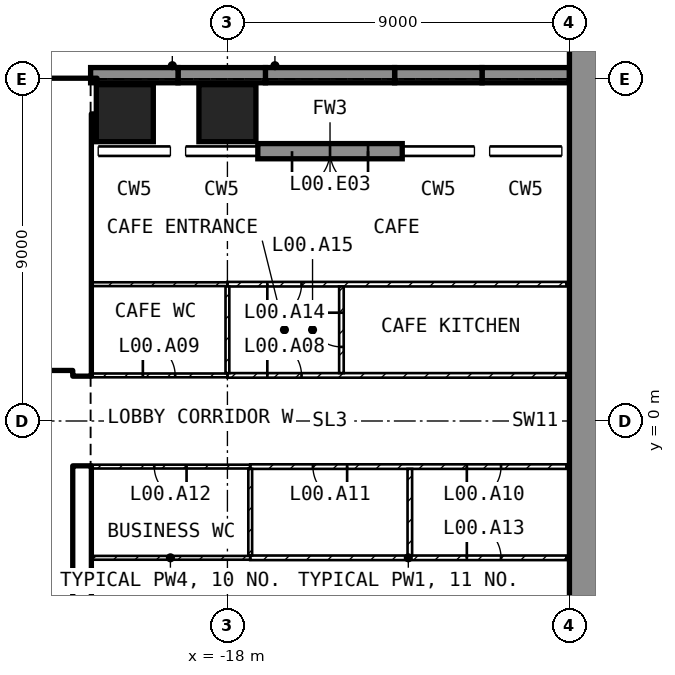
"""IFC4 building model, lengths in metres.
Left out: names, types, materials, properties, quantities, classifications, styles, units other than length and angle.
Written with IfcOpenShell. Run it as: python <this file> out.ifc"""

import sys

from ifc_helpers import new_model, si_unit, direction, frame, frame_2d, origin, origin_2d, place, context, subcontext, project, spatial, polyline, rectangle, outline, extrude, element, fill, save


model = new_model("IFC4")
c1 = context("Model", 3, precision=1e-05, world=origin(), true_north=direction((0.0, 1.0)))
c2 = subcontext(c1, "Body", "Model", "MODEL_VIEW")
j1 = project(units=[si_unit("LENGTHUNIT", "METRE"), si_unit("PLANEANGLEUNIT", "RADIAN")], contexts=[c1])
p1 = place(None, origin())
s1 = spatial("IfcSite", under=j1, at=p1, CompositionType="ELEMENT")
p2 = place(p1, origin())
s2 = spatial("IfcBuilding", under=s1, at=p2, CompositionType="ELEMENT")
p3 = place(p2, origin())
s3 = spatial("IfcBuildingStorey", under=s2, at=p3, CompositionType="ELEMENT", Elevation=0.0)
p4 = place(p3, frame((-7.65, -25.2, -0.4), z_axis=(0.0, 0.0, 1.0), x_axis=(0.0, 1.0, 0.0)))
e1 = element("IfcWall", 1, at=p4, inside=s3, PredefinedType="SOLIDWALL", context=c2, shape_type="SweptSolid", body=[
    extrude(rectangle(XDim=50.4, YDim=2.7, at=frame_2d((25.2, 0.0))), origin(), (0.0, 0.0, 1.0), 20.0),
])
for number, where, z_axis, x_axis in (
    (2, (-20.7, 8.1, -0.4), (0.0, 0.0, 1.0), (1.0, 0.0, 0.0)),
    (3, (-18.0, 8.1, -0.4), (0.0, 0.0, 1.0), (1.0, 0.0, 0.0)),
):
    element("IfcColumn", number, at=place(p3, frame(where, z_axis=z_axis, x_axis=x_axis)), inside=s3, PredefinedType="COLUMN", context=c2, shape_type="SweptSolid", body=[
        extrude(rectangle(XDim=1.5, YDim=1.5, at=origin_2d()), origin(), (0.0, 0.0, 1.0), 15.1),
    ])
for number, where, z_axis, x_axis in (
    (4, (-9.0, 8.9, 0.0), (0.0, 1.0, 0.0), (-1.0, 0.0, 0.0)),
    (5, (-11.3, 8.9, 0.0), (0.0, 1.0, 0.0), (-1.0, 0.0, 0.0)),
):
    element("IfcWall", number, at=place(p3, frame(where, z_axis=z_axis, x_axis=x_axis)), inside=s3, PredefinedType="SOLIDWALL", context=c2, shape_type="SweptSolid", body=[
        extrude(outline(polyline([(0.0, 0.0), (0.3, 0.0), (0.3, 9.0), (0.316, 9.166), (0.365, 9.325), (0.443, 9.472), (0.549, 9.601), (0.678, 9.707), (0.825, 9.785), (0.984, 9.834), (1.15, 9.85), (1.316, 9.834), (1.475, 9.785), (1.622, 9.707), (1.751, 9.601), (1.857, 9.472), (1.935, 9.325), (1.984, 9.166), (2.0, 9.0), (2.0, 0.0), (2.3, 0.0), (2.3, 14.0), (0.0, 14.0), (0.0, 0.0)])), origin(), (0.0, 0.0, 1.0), 0.4),
    ])
p5 = place(p3, frame((-13.6, 8.9, 0.0), z_axis=(0.0, 1.0, 0.0), x_axis=(-1.0, 0.0, 0.0)))
e6 = element("IfcWall", 6, at=p5, inside=s3, PredefinedType="SOLIDWALL", context=c2, shape_type="SweptSolid", body=[
    extrude(outline(polyline([(0.0, 0.0), (0.3, 0.0), (0.3, 9.0), (0.327, 9.273), (0.406, 9.536), (0.536, 9.778), (0.71, 9.99), (0.922, 10.164), (1.164, 10.293), (1.427, 10.373), (1.7, 10.4), (1.973, 10.373), (2.236, 10.293), (2.478, 10.164), (2.69, 9.99), (2.864, 9.778), (2.993, 9.536), (3.073, 9.273), (3.1, 9.0), (3.1, 0.0), (3.4, 0.0), (3.4, 14.0), (0.0, 14.0), (0.0, 0.0)])), origin(), (0.0, 0.0, 1.0), 0.4),
])
p6 = place(p3, frame((-13.4, 7.1, 0.0), z_axis=(0.0, 0.0, 1.0), x_axis=(-1.0, 0.0, 0.0)))
e7 = element("IfcWall", 7, at=p6, inside=s3, PredefinedType="SOLIDWALL", context=c2, shape_type="SweptSolid", body=[
    extrude(rectangle(XDim=3.8, YDim=0.4, at=frame_2d((1.9, 0.0))), origin(), (0.0, 0.0, 1.0), 14.7),
])
p7 = place(p6, frame((0.9, 0.0, 0.0)))
e8 = element("IfcOpeningElement", 8, at=p7, cuts=e7, PredefinedType="OPENING", context=c2, shape_type="SweptSolid", body=[
    extrude(rectangle(XDim=2.0, YDim=2.4, at=frame_2d((1.0, 1.2))), frame((0.0, 0.21, 0.0), z_axis=(0.0, -1.0, 0.0), x_axis=(1.0, 0.0, 0.0)), (0.0, 0.0, 1.0), 0.42),
])
for number, where, z_axis, x_axis in (
    (9, (-17.0, 8.9, 0.0), (0.0, 1.0, 0.0), (-1.0, 0.0, 0.0)),
    (10, (-19.3, 8.9, 0.0), (0.0, 1.0, 0.0), (-1.0, 0.0, 0.0)),
):
    element("IfcWall", number, at=place(p3, frame(where, z_axis=z_axis, x_axis=x_axis)), inside=s3, PredefinedType="SOLIDWALL", context=c2, shape_type="SweptSolid", body=[
        extrude(outline(polyline([(0.0, 0.0), (0.3, 0.0), (0.3, 9.0), (0.316, 9.166), (0.365, 9.325), (0.443, 9.472), (0.549, 9.601), (0.678, 9.707), (0.825, 9.785), (0.984, 9.834), (1.15, 9.85), (1.316, 9.834), (1.475, 9.785), (1.622, 9.707), (1.751, 9.601), (1.857, 9.472), (1.935, 9.325), (1.984, 9.166), (2.0, 9.0), (2.0, 0.0), (2.3, 0.0), (2.3, 14.0), (0.0, 14.0), (0.0, 0.0)])), origin(), (0.0, 0.0, 1.0), 0.4),
    ])
p8 = place(p3, frame((-31.5, 8.55, 0.0), z_axis=(0.0, 0.0, 1.0), x_axis=(1.0, 0.0, 0.0)))
e11 = element("IfcWall", 11, at=p8, inside=s3, PredefinedType="SHEAR", context=c2, shape_type="SweptSolid", body=[
    extrude(rectangle(XDim=10.05, YDim=0.9, at=frame_2d((5.025, 0.0))), origin(), (0.0, 0.0, 1.0), 14.7),
])
p9 = place(p8, frame((8.25, 0.0, 0.0)))
e12 = element("IfcOpeningElement", 12, at=p9, cuts=e11, PredefinedType="OPENING", context=c2, shape_type="SweptSolid", body=[
    extrude(rectangle(XDim=1.0, YDim=2.1, at=frame_2d((0.5, 1.05))), frame((0.0, 0.46, 0.0), z_axis=(0.0, -1.0, 0.0), x_axis=(1.0, 0.0, 0.0)), (0.0, 0.0, 1.0), 0.92),
])
for number, where, z_axis, x_axis in (
    (13, (-21.825, -8.1, 0.0), (0.0, 0.0, 1.0), (0.0, 1.0, 0.0)),
    (14, (-21.825, 1.2, 0.0), (0.0, 0.0, 1.0), (0.0, 1.0, 0.0)),
):
    element("IfcWall", number, at=place(p3, frame(where, z_axis=z_axis, x_axis=x_axis)), inside=s3, PredefinedType="SHEAR", context=c2, shape_type="SweptSolid", body=[
        extrude(rectangle(XDim=6.9, YDim=0.45, at=frame_2d((3.45, 0.0))), origin(), (0.0, 0.0, 1.0), 14.7),
    ])
p10 = place(p3, frame((-35.1, 1.45, 0.0), z_axis=(0.0, 0.0, 1.0), x_axis=(1.0, 0.0, 0.0)))
e15 = element("IfcWall", 15, at=p10, inside=s3, PredefinedType="SOLIDWALL", context=c2, shape_type="SweptSolid", body=[
    extrude(rectangle(XDim=13.05, YDim=0.2, at=frame_2d((6.525, 0.0))), origin(), (0.0, 0.0, 1.0), 14.7),
])
p11 = place(p10, frame((3.45, 0.0, 0.0)))
e16 = element("IfcOpeningElement", 16, at=p11, cuts=e15, PredefinedType="OPENING", context=c2, shape_type="SweptSolid", body=[
    extrude(rectangle(XDim=1.0, YDim=2.1, at=frame_2d((0.5, 1.05))), frame((0.0, 0.11, 0.0), z_axis=(0.0, -1.0, 0.0), x_axis=(1.0, 0.0, 0.0)), (0.0, 0.0, 1.0), 0.22),
])
p12 = place(p10, frame((0.95, 0.0, 0.0)))
e17 = element("IfcOpeningElement", 17, at=p12, cuts=e15, PredefinedType="OPENING", context=c2, shape_type="SweptSolid", body=[
    extrude(rectangle(XDim=1.0, YDim=2.1, at=frame_2d((0.5, 1.05))), frame((0.0, 0.11, 0.0), z_axis=(0.0, -1.0, 0.0), x_axis=(1.0, 0.0, 0.0)), (0.0, 0.0, 1.0), 0.22),
])
p13 = place(p10, frame((11.3, 0.0, 0.0)))
e18 = element("IfcOpeningElement", 18, at=p13, cuts=e15, PredefinedType="OPENING", context=c2, shape_type="SweptSolid", body=[
    extrude(rectangle(XDim=1.0, YDim=2.1, at=frame_2d((0.5, 1.05))), frame((0.0, 0.11, 0.0), z_axis=(0.0, -1.0, 0.0), x_axis=(1.0, 0.0, 0.0)), (0.0, 0.0, 1.0), 0.22),
])
p14 = place(p10, frame((8.8, 0.0, 0.0)))
e19 = element("IfcOpeningElement", 19, at=p14, cuts=e15, PredefinedType="OPENING", context=c2, shape_type="SweptSolid", body=[
    extrude(rectangle(XDim=1.0, YDim=2.1, at=frame_2d((0.5, 1.05))), frame((0.0, 0.11, 0.0), z_axis=(0.0, -1.0, 0.0), x_axis=(1.0, 0.0, 0.0)), (0.0, 0.0, 1.0), 0.22),
])
p15 = place(p3, frame((-28.35, 5.15, 0.0), z_axis=(0.0, 0.0, 1.0), x_axis=(1.0, 0.0, 0.0)))
e20 = element("IfcWall", 20, at=p15, inside=s3, PredefinedType="SOLIDWALL", context=c2, shape_type="SweptSolid", body=[
    extrude(rectangle(XDim=6.3, YDim=0.2, at=frame_2d((3.15, 0.0))), origin(), (0.0, 0.0, 1.0), 14.7),
])
p16 = place(p15, frame((5.1, 0.0, 0.0)))
e21 = element("IfcOpeningElement", 21, at=p16, cuts=e20, PredefinedType="OPENING", context=c2, shape_type="SweptSolid", body=[
    extrude(rectangle(XDim=1.0, YDim=2.1, at=frame_2d((0.5, 1.05))), frame((0.0, 0.11, 0.0), z_axis=(0.0, -1.0, 0.0), x_axis=(1.0, 0.0, 0.0)), (0.0, 0.0, 1.0), 0.22),
])
p17 = place(p3, frame((-18.0, 1.2, 0.0), z_axis=(0.0, 0.0, 1.0), x_axis=(1.0, 0.0, 0.0)))
e22 = element("IfcWall", 22, at=p17, inside=s3, PredefinedType="PARTITIONING", context=c2, shape_type="SweptSolid", body=[
    extrude(rectangle(XDim=8.92, YDim=0.12, at=frame_2d((4.46, 0.0))), origin(), (0.0, 0.0, 1.0), 14.7),
])
p18 = place(p17, frame((1.05, 0.0, 0.0)))
e23 = element("IfcOpeningElement", 23, at=p18, cuts=e22, PredefinedType="OPENING", context=c2, shape_type="SweptSolid", body=[
    extrude(rectangle(XDim=0.9, YDim=2.1, at=frame_2d((0.45, 1.05))), frame((0.0, 0.07, 0.0), z_axis=(0.0, -1.0, 0.0), x_axis=(1.0, 0.0, 0.0)), (0.0, 0.0, 1.0), 0.14),
])
p19 = place(p3, frame((-21.6, 1.2, 0.0), z_axis=(0.0, 0.0, 1.0), x_axis=(1.0, 0.0, 0.0)))
e24 = element("IfcWall", 24, at=p19, inside=s3, PredefinedType="PARTITIONING", context=c2, shape_type="SweptSolid", body=[
    extrude(rectangle(XDim=3.6, YDim=0.1, at=frame_2d((1.8, 0.0))), origin(), (0.0, 0.0, 1.0), 14.7),
])
p20 = place(p19, frame((1.375, 0.0, 0.0)))
e25 = element("IfcOpeningElement", 25, at=p20, cuts=e24, PredefinedType="OPENING", context=c2, shape_type="SweptSolid", body=[
    extrude(rectangle(XDim=0.85, YDim=2.1, at=frame_2d((0.425, 1.05))), frame((0.0, 0.06, 0.0), z_axis=(0.0, -1.0, 0.0), x_axis=(1.0, 0.0, 0.0)), (0.0, 0.0, 1.0), 0.12),
])
p21 = place(p3, frame((-9.08, -1.2, 0.0), z_axis=(0.0, 0.0, 1.0), x_axis=(-1.0, 0.0, 0.0)))
e26 = element("IfcWall", 26, at=p21, inside=s3, PredefinedType="PARTITIONING", context=c2, shape_type="SweptSolid", body=[
    extrude(rectangle(XDim=8.32, YDim=0.12, at=frame_2d((4.16, 0.0))), origin(), (0.0, 0.0, 1.0), 14.7),
])
p22 = place(p21, frame((1.72, 0.0, 0.0)))
e27 = element("IfcOpeningElement", 27, at=p22, cuts=e26, PredefinedType="OPENING", context=c2, shape_type="SweptSolid", body=[
    extrude(rectangle(XDim=0.9, YDim=2.1, at=frame_2d((0.45, 1.05))), frame((0.0, 0.07, 0.0), z_axis=(0.0, -1.0, 0.0), x_axis=(1.0, 0.0, 0.0)), (0.0, 0.0, 1.0), 0.14),
])
p23 = place(p21, frame((5.77, 0.0, 0.0)))
e28 = element("IfcOpeningElement", 28, at=p23, cuts=e26, PredefinedType="OPENING", context=c2, shape_type="SweptSolid", body=[
    extrude(rectangle(XDim=0.9, YDim=2.1, at=frame_2d((0.45, 1.05))), frame((0.0, 0.07, 0.0), z_axis=(0.0, -1.0, 0.0), x_axis=(1.0, 0.0, 0.0)), (0.0, 0.0, 1.0), 0.14),
])
p24 = place(p3, frame((-17.4, -1.2, 0.0), z_axis=(0.0, 0.0, 1.0), x_axis=(-1.0, 0.0, 0.0)))
e29 = element("IfcWall", 29, at=p24, inside=s3, PredefinedType="PARTITIONING", context=c2, shape_type="SweptSolid", body=[
    extrude(rectangle(XDim=4.2, YDim=0.1, at=frame_2d((2.1, 0.0))), origin(), (0.0, 0.0, 1.0), 14.7),
])
p25 = place(p24, frame((1.675, 0.0, 0.0)))
e30 = element("IfcOpeningElement", 30, at=p25, cuts=e29, PredefinedType="OPENING", context=c2, shape_type="SweptSolid", body=[
    extrude(rectangle(XDim=0.85, YDim=2.1, at=frame_2d((0.425, 1.05))), frame((0.0, 0.06, 0.0), z_axis=(0.0, -1.0, 0.0), x_axis=(1.0, 0.0, 0.0)), (0.0, 0.0, 1.0), 0.12),
])
p26 = place(p3, frame((-9.08, 3.6, 0.0), z_axis=(0.0, 0.0, 1.0), x_axis=(-1.0, 0.0, 0.0)))
e31 = element("IfcWall", 31, at=p26, inside=s3, PredefinedType="PARTITIONING", context=c2, shape_type="SweptSolid", body=[
    extrude(rectangle(XDim=8.92, YDim=0.12, at=frame_2d((4.46, 0.0))), origin(), (0.0, 0.0, 1.0), 14.7),
])
p27 = place(p26, frame((6.97, 0.0, 0.0)))
e32 = element("IfcOpeningElement", 32, at=p27, cuts=e31, PredefinedType="OPENING", context=c2, shape_type="SweptSolid", body=[
    extrude(rectangle(XDim=0.9, YDim=2.1, at=frame_2d((0.45, 1.05))), frame((0.0, 0.07, 0.0), z_axis=(0.0, -1.0, 0.0), x_axis=(1.0, 0.0, 0.0)), (0.0, 0.0, 1.0), 0.14),
])
p28 = place(p3, frame((-18.0, 3.6, 0.0), z_axis=(0.0, 0.0, 1.0), x_axis=(-1.0, 0.0, 0.0)))
e33 = element("IfcWall", 33, at=p28, inside=s3, PredefinedType="PARTITIONING", context=c2, shape_type="SweptSolid", body=[
    extrude(rectangle(XDim=3.6, YDim=0.1, at=frame_2d((1.8, 0.0))), origin(), (0.0, 0.0, 1.0), 14.7),
])
p29 = place(p3, frame((-15.0, 1.26, 0.0), z_axis=(0.0, 0.0, 1.0), x_axis=(0.0, 1.0, 0.0)))
e34 = element("IfcWall", 34, at=p29, inside=s3, PredefinedType="PARTITIONING", context=c2, shape_type="SweptSolid", body=[
    extrude(rectangle(XDim=2.28, YDim=0.12, at=frame_2d((1.14, 0.0))), origin(), (0.0, 0.0, 1.0), 14.7),
])
p30 = place(p29, frame((0.69, 0.0, 0.0)))
e35 = element("IfcOpeningElement", 35, at=p30, cuts=e34, PredefinedType="OPENING", context=c2, shape_type="SweptSolid", body=[
    extrude(rectangle(XDim=0.9, YDim=2.1, at=frame_2d((0.45, 1.05))), frame((0.0, 0.07, 0.0), z_axis=(0.0, -1.0, 0.0), x_axis=(1.0, 0.0, 0.0)), (0.0, 0.0, 1.0), 0.14),
])
p31 = place(p3, frame((-18.0, 1.26, 0.0), z_axis=(0.0, 0.0, 1.0), x_axis=(0.0, 1.0, 0.0)))
e36 = element("IfcWall", 36, at=p31, inside=s3, PredefinedType="PARTITIONING", context=c2, shape_type="SweptSolid", body=[
    extrude(rectangle(XDim=2.28, YDim=0.1, at=frame_2d((1.14, 0.0))), origin(), (0.0, 0.0, 1.0), 13.72),
])
p32 = place(p3, frame((-17.4, -3.6, 0.0), z_axis=(0.0, 0.0, 1.0), x_axis=(1.0, 0.0, 0.0)))
e37 = element("IfcWall", 37, at=p32, inside=s3, PredefinedType="PARTITIONING", context=c2, shape_type="SweptSolid", body=[
    extrude(rectangle(XDim=8.32, YDim=0.12, at=frame_2d((4.16, 0.0))), origin(), (0.0, 0.0, 1.0), 14.7),
])
p33 = place(p32, frame((5.7, 0.0, 0.0)))
e38 = element("IfcOpeningElement", 38, at=p33, cuts=e37, PredefinedType="OPENING", context=c2, shape_type="SweptSolid", body=[
    extrude(rectangle(XDim=0.9, YDim=2.1, at=frame_2d((0.45, 1.05))), frame((0.0, 0.07, 0.0), z_axis=(0.0, -1.0, 0.0), x_axis=(1.0, 0.0, 0.0)), (0.0, 0.0, 1.0), 0.14),
])
p34 = place(p3, frame((-21.6, -3.6, 0.0), z_axis=(0.0, 0.0, 1.0), x_axis=(1.0, 0.0, 0.0)))
e39 = element("IfcWall", 39, at=p34, inside=s3, PredefinedType="PARTITIONING", context=c2, shape_type="SweptSolid", body=[
    extrude(rectangle(XDim=4.2, YDim=0.1, at=frame_2d((2.1, 0.0))), origin(), (0.0, 0.0, 1.0), 14.7),
])
p35 = place(p3, frame((-13.2, -3.54, 0.0), z_axis=(0.0, 0.0, 1.0), x_axis=(0.0, 1.0, 0.0)))
e40 = element("IfcWall", 40, at=p35, inside=s3, PredefinedType="PARTITIONING", context=c2, shape_type="SweptSolid", body=[
    extrude(rectangle(XDim=2.28, YDim=0.12, at=frame_2d((1.14, 0.0))), origin(), (0.0, 0.0, 1.0), 14.007),
])
p36 = place(p3, frame((-17.4, -3.54, 0.0), z_axis=(0.0, 0.0, 1.0), x_axis=(0.0, 1.0, 0.0)))
e41 = element("IfcWall", 41, at=p36, inside=s3, PredefinedType="PARTITIONING", context=c2, shape_type="SweptSolid", body=[
    extrude(rectangle(XDim=2.28, YDim=0.1, at=frame_2d((1.14, 0.0))), origin(), (0.0, 0.0, 1.0), 14.7),
])
p37 = place(p7, origin())
e42 = element("IfcDoor", 42, at=p37, inside=s3, OperationType="DOUBLE_DOOR_SINGLE_SWING", PredefinedType="DOOR", context=c2, shape_type="SweptSolid", body=[
    extrude(rectangle(XDim=2.0, YDim=2.4, at=frame_2d((1.0, 1.2))), frame((0.0, 0.025, 0.0), z_axis=(0.0, -1.0, 0.0), x_axis=(1.0, 0.0, 0.0)), (0.0, 0.0, 1.0), 0.05),
])
fill(e8, e42)
p38 = place(p16, origin())
e43 = element("IfcDoor", 43, at=p38, inside=s3, OperationType="SINGLE_SWING_LEFT", PredefinedType="DOOR", context=c2, shape_type="SweptSolid", body=[
    extrude(rectangle(XDim=1.0, YDim=2.1, at=frame_2d((0.5, 1.05))), frame((0.0, 0.025, 0.0), z_axis=(0.0, -1.0, 0.0), x_axis=(1.0, 0.0, 0.0)), (0.0, 0.0, 1.0), 0.05),
])
fill(e21, e43)
p39 = place(p9, origin())
e44 = element("IfcDoor", 44, at=p39, inside=s3, OperationType="SINGLE_SWING_LEFT", PredefinedType="DOOR", context=c2, shape_type="SweptSolid", body=[
    extrude(rectangle(XDim=1.0, YDim=2.1, at=frame_2d((0.5, 1.05))), frame((0.0, 0.025, 0.0), z_axis=(0.0, -1.0, 0.0), x_axis=(1.0, 0.0, 0.0)), (0.0, 0.0, 1.0), 0.05),
])
fill(e12, e44)
p40 = place(p18, origin())
e45 = element("IfcDoor", 45, at=p40, inside=s3, OperationType="SINGLE_SWING_LEFT", PredefinedType="DOOR", context=c2, shape_type="SweptSolid", body=[
    extrude(rectangle(XDim=0.9, YDim=2.1, at=frame_2d((0.45, 1.05))), frame((0.0, 0.025, 0.0), z_axis=(0.0, -1.0, 0.0), x_axis=(1.0, 0.0, 0.0)), (0.0, 0.0, 1.0), 0.05),
])
fill(e23, e45)
p41 = place(p20, origin())
e46 = element("IfcDoor", 46, at=p41, inside=s3, OperationType="SINGLE_SWING_LEFT", PredefinedType="DOOR", context=c2, shape_type="SweptSolid", body=[
    extrude(rectangle(XDim=0.85, YDim=2.1, at=frame_2d((0.425, 1.05))), frame((0.0, 0.025, 0.0), z_axis=(0.0, -1.0, 0.0), x_axis=(1.0, 0.0, 0.0)), (0.0, 0.0, 1.0), 0.05),
])
fill(e25, e46)
p42 = place(p22, origin())
e47 = element("IfcDoor", 47, at=p42, inside=s3, OperationType="SINGLE_SWING_RIGHT", PredefinedType="DOOR", context=c2, shape_type="SweptSolid", body=[
    extrude(rectangle(XDim=0.9, YDim=2.1, at=frame_2d((0.45, 1.05))), frame((0.0, 0.025, 0.0), z_axis=(0.0, -1.0, 0.0), x_axis=(1.0, 0.0, 0.0)), (0.0, 0.0, 1.0), 0.05),
])
fill(e27, e47)
p43 = place(p23, origin())
e48 = element("IfcDoor", 48, at=p43, inside=s3, OperationType="SINGLE_SWING_LEFT", PredefinedType="DOOR", context=c2, shape_type="SweptSolid", body=[
    extrude(rectangle(XDim=0.9, YDim=2.1, at=frame_2d((0.45, 1.05))), frame((0.0, 0.025, 0.0), z_axis=(0.0, -1.0, 0.0), x_axis=(1.0, 0.0, 0.0)), (0.0, 0.0, 1.0), 0.05),
])
fill(e28, e48)
p44 = place(p25, origin())
e49 = element("IfcDoor", 49, at=p44, inside=s3, OperationType="SINGLE_SWING_LEFT", PredefinedType="DOOR", context=c2, shape_type="SweptSolid", body=[
    extrude(rectangle(XDim=0.85, YDim=2.1, at=frame_2d((0.425, 1.05))), frame((0.0, 0.025, 0.0), z_axis=(0.0, -1.0, 0.0), x_axis=(1.0, 0.0, 0.0)), (0.0, 0.0, 1.0), 0.05),
])
fill(e30, e49)
p45 = place(p33, origin())
e50 = element("IfcDoor", 50, at=p45, inside=s3, OperationType="SINGLE_SWING_LEFT", PredefinedType="DOOR", context=c2, shape_type="SweptSolid", body=[
    extrude(rectangle(XDim=0.9, YDim=2.1, at=frame_2d((0.45, 1.05))), frame((0.0, 0.025, 0.0), z_axis=(0.0, -1.0, 0.0), x_axis=(1.0, 0.0, 0.0)), (0.0, 0.0, 1.0), 0.05),
])
fill(e38, e50)
p46 = place(p27, origin())
e51 = element("IfcDoor", 51, at=p46, inside=s3, OperationType="SINGLE_SWING_RIGHT", PredefinedType="DOOR", context=c2, shape_type="SweptSolid", body=[
    extrude(rectangle(XDim=0.9, YDim=2.1, at=frame_2d((0.45, 1.05))), frame((0.0, 0.025, 0.0), z_axis=(0.0, -1.0, 0.0), x_axis=(1.0, 0.0, 0.0)), (0.0, 0.0, 1.0), 0.05),
])
fill(e32, e51)
p47 = place(p30, origin())
e52 = element("IfcDoor", 52, at=p47, inside=s3, OperationType="SINGLE_SWING_RIGHT", PredefinedType="DOOR", context=c2, shape_type="SweptSolid", body=[
    extrude(rectangle(XDim=0.9, YDim=2.1, at=frame_2d((0.45, 1.05))), frame((0.0, 0.025, 0.0), z_axis=(0.0, -1.0, 0.0), x_axis=(1.0, 0.0, 0.0)), (0.0, 0.0, 1.0), 0.05),
])
fill(e35, e52)
save(model, sys.argv[1])
